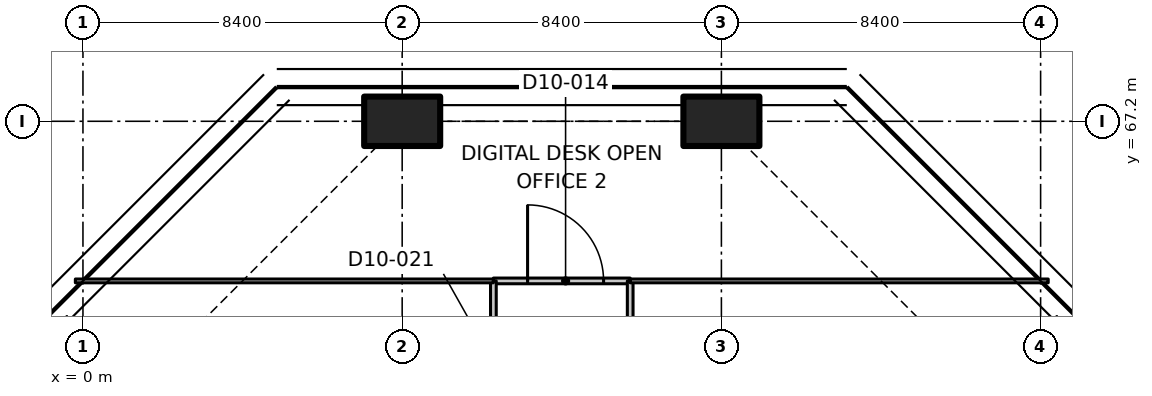
"""IFC4 building model, lengths in metres.
Left out: names, types, materials, properties, quantities, classifications, styles, units other than length and angle.
Written with IfcOpenShell. Run it as: python <this file> out.ifc"""

import sys

from ifc_helpers import new_model, si_unit, direction, frame, frame_2d, origin, origin_2d, place, context, subcontext, project, spatial, polyline, rectangle, outline, extrude, element, fill, save


model = new_model("IFC4")
c1 = context("Model", 3, precision=1e-05, world=origin(), true_north=direction((0.0, 1.0)))
c2 = subcontext(c1, "Body", "Model", "MODEL_VIEW")
j1 = project(units=[si_unit("LENGTHUNIT", "METRE"), si_unit("PLANEANGLEUNIT", "RADIAN")], contexts=[c1])
p1 = place(None, origin())
s1 = spatial("IfcSite", under=j1, at=p1, CompositionType="ELEMENT")
p2 = place(p1, origin())
s2 = spatial("IfcBuilding", under=s1, at=p2, CompositionType="ELEMENT")
p3 = place(p2, frame((0.0, 0.0, 76.1)))
s3 = spatial("IfcBuildingStorey", under=s2, at=p3, CompositionType="ELEMENT", Elevation=76.1)
for number, where, z_axis, x_axis in (
    (1, (8.4, 67.2, 0.0), (0.0, 0.0, 1.0), (0.0, 1.0, 0.0)),
    (2, (16.8, 67.2, 0.0), (0.0, 0.0, 1.0), (0.0, 1.0, 0.0)),
):
    element("IfcColumn", number, at=place(p3, frame(where, z_axis=z_axis, x_axis=x_axis)), inside=s3, PredefinedType="COLUMN", context=c2, shape_type="SweptSolid", body=[
        extrude(rectangle(XDim=1.3, YDim=2.0, at=origin_2d()), origin(), (0.0, 0.0, 1.0), 3.35),
    ])
p4 = place(p3, frame((10.8, 63.0, 0.0), z_axis=(0.0, 0.0, 1.0), x_axis=(1.0, 0.0, 0.0)))
e3 = element("IfcWall", 3, at=p4, inside=s3, PredefinedType="PARTITIONING", context=c2, shape_type="SweptSolid", body=[
    extrude(rectangle(XDim=3.6, YDim=0.15, at=frame_2d((1.8, 0.0))), origin(), (0.0, 0.0, 1.0), 3.33),
])
p5 = place(p4, frame((0.9, 0.0, 0.0)))
e4 = element("IfcOpeningElement", 4, at=p5, cuts=e3, PredefinedType="OPENING", context=c2, shape_type="SweptSolid", body=[
    extrude(rectangle(XDim=2.0, YDim=2.4, at=frame_2d((1.0, 1.2))), frame((0.0, 0.085, 0.0), z_axis=(0.0, -1.0, 0.0), x_axis=(1.0, 0.0, 0.0)), (0.0, 0.0, 1.0), 0.17),
])
p6 = place(p3, frame((10.8, 58.8, 0.0), z_axis=(0.0, 0.0, 1.0), x_axis=(0.0, 1.0, 0.0)))
e5 = element("IfcWall", 5, at=p6, inside=s3, PredefinedType="PARTITIONING", context=c2, shape_type="SweptSolid", body=[
    extrude(rectangle(XDim=4.2, YDim=0.15, at=frame_2d((2.1, 0.0))), origin(), (0.0, 0.0, 1.0), 3.33),
])
p7 = place(p6, frame((1.5, 0.0, 0.0)))
e6 = element("IfcOpeningElement", 6, at=p7, cuts=e5, PredefinedType="OPENING", context=c2, shape_type="SweptSolid", body=[
    extrude(rectangle(XDim=1.1, YDim=2.1, at=frame_2d((0.55, 1.05))), frame((0.0, 0.085, 0.0), z_axis=(0.0, -1.0, 0.0), x_axis=(1.0, 0.0, 0.0)), (0.0, 0.0, 1.0), 0.17),
])
p8 = place(p3, frame((14.4, 63.0, 0.0), z_axis=(0.0, 0.0, 1.0), x_axis=(0.0, -1.0, 0.0)))
e7 = element("IfcWall", 7, at=p8, inside=s3, PredefinedType="PARTITIONING", context=c2, shape_type="SweptSolid", body=[
    extrude(rectangle(XDim=4.2, YDim=0.15, at=frame_2d((2.1, 0.0))), origin(), (0.0, 0.0, 1.0), 3.33),
])
p9 = place(p8, frame((1.5, 0.0, 0.0)))
e8 = element("IfcOpeningElement", 8, at=p9, cuts=e7, PredefinedType="OPENING", context=c2, shape_type="SweptSolid", body=[
    extrude(rectangle(XDim=1.1, YDim=2.1, at=frame_2d((0.55, 1.05))), frame((0.0, 0.085, 0.0), z_axis=(0.0, -1.0, 0.0), x_axis=(1.0, 0.0, 0.0)), (0.0, 0.0, 1.0), 0.17),
])
p10 = place(p3, frame((10.8, 63.0, 0.0), z_axis=(0.0, 0.0, 1.0), x_axis=(-1.0, 0.0, 0.0)))
e9 = element("IfcWall", 9, at=p10, inside=s3, PredefinedType="PARTITIONING", context=c2, shape_type="SweptSolid", body=[
    extrude(outline(polyline([(0.0, 0.0), (11.0, 0.0), (11.0, 3.33), (7.266, 3.33), (7.264, 2.98), (5.936, 2.98), (5.934, 3.33), (0.0, 3.33), (0.0, 0.0)])), frame((0.0, 0.05, 0.0), z_axis=(0.0, -1.0, 0.0), x_axis=(1.0, 0.0, 0.0)), (0.0, 0.0, 1.0), 0.1),
])
p11 = place(p3, frame((25.4, 63.0, 0.0), z_axis=(0.0, 0.0, 1.0), x_axis=(-1.0, 0.0, 0.0)))
e10 = element("IfcWall", 10, at=p11, inside=s3, PredefinedType="PARTITIONING", context=c2, shape_type="SweptSolid", body=[
    extrude(outline(polyline([(0.0, 0.0), (11.0, 0.0), (11.0, 3.33), (5.066, 3.33), (5.064, 2.98), (3.736, 2.98), (3.734, 3.33), (0.0, 3.33), (0.0, 0.0)])), frame((0.0, 0.05, 0.0), z_axis=(0.0, -1.0, 0.0), x_axis=(1.0, 0.0, 0.0)), (0.0, 0.0, 1.0), 0.1),
])
p12 = place(p5, origin())
e11 = element("IfcDoor", 11, at=p12, inside=s3, OperationType="DOUBLE_DOOR_SINGLE_SWING", PredefinedType="DOOR", context=c2, shape_type="SweptSolid", body=[
    extrude(rectangle(XDim=2.0, YDim=2.4, at=frame_2d((1.0, 1.2))), frame((0.0, 0.025, 0.0), z_axis=(0.0, -1.0, 0.0), x_axis=(1.0, 0.0, 0.0)), (0.0, 0.0, 1.0), 0.05),
])
fill(e4, e11)
save(model, sys.argv[1])
